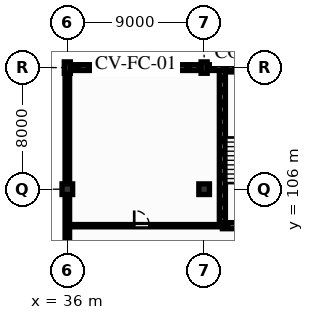
"""IFC4 building model, lengths in metres.
Left out: names, types, materials, properties, quantities, classifications, styles, units other than length and angle.
Written with IfcOpenShell. Run it as: python <this file> out.ifc"""

import sys

from ifc_helpers import new_model, si_unit, direction, frame, frame_2d, origin, origin_2d, place, context, subcontext, project, spatial, rectangle, extrude, element, fill, save


model = new_model("IFC4")
c1 = context("Model", 3, precision=1e-05, world=origin(), true_north=direction((0.0, 1.0)))
c2 = subcontext(c1, "Body", "Model", "MODEL_VIEW")
j1 = project(units=[si_unit("LENGTHUNIT", "METRE"), si_unit("PLANEANGLEUNIT", "RADIAN")], contexts=[c1])
p1 = place(None, origin())
s1 = spatial("IfcSite", under=j1, at=p1, CompositionType="ELEMENT")
p2 = place(p1, origin())
s2 = spatial("IfcBuilding", under=s1, at=p2, CompositionType="ELEMENT")
p3 = place(p2, frame((0.0, 0.0, 12.78)))
s3 = spatial("IfcBuildingStorey", under=s2, at=p3, CompositionType="ELEMENT", Elevation=12.78)
p4 = place(p3, frame((36.0, 106.0, 0.0), z_axis=(0.0, 0.0, 1.0), x_axis=(1.0, 0.0, 0.0)))
e1 = element("IfcColumn", 1, at=p4, inside=s3, PredefinedType="COLUMN", context=c2, shape_type="SweptSolid", body=[
    extrude(rectangle(XDim=0.7, YDim=0.7, at=origin_2d()), origin(), (0.0, 0.0, 1.0), 3.74),
])
p5 = place(p3, frame((36.0, 114.0, 0.0), z_axis=(0.0, 0.0, 1.0), x_axis=(0.0, 1.0, 0.0)))
e2 = element("IfcColumn", 2, at=p5, inside=s3, PredefinedType="COLUMN", context=c2, shape_type="SweptSolid", body=[
    extrude(rectangle(XDim=0.4, YDim=0.75, at=origin_2d()), origin(), (0.0, 0.0, 1.0), 3.74),
])
p6 = place(p3, frame((45.0, 106.0, 0.0), z_axis=(0.0, 0.0, 1.0), x_axis=(1.0, 0.0, 0.0)))
e3 = element("IfcColumn", 3, at=p6, inside=s3, PredefinedType="COLUMN", context=c2, shape_type="SweptSolid", body=[
    extrude(rectangle(XDim=0.7, YDim=0.7, at=origin_2d()), origin(), (0.0, 0.0, 1.0), 3.74),
])
p7 = place(p3, frame((45.0, 114.0, 0.0), z_axis=(0.0, 0.0, 1.0), x_axis=(0.0, 1.0, 0.0)))
e4 = element("IfcColumn", 4, at=p7, inside=s3, PredefinedType="COLUMN", context=c2, shape_type="SweptSolid", body=[
    extrude(rectangle(XDim=0.4, YDim=0.75, at=origin_2d()), origin(), (0.0, 0.0, 1.0), 3.74),
])
p8 = place(p3, frame((36.0, 114.0, 0.0), z_axis=(0.0, 0.0, 1.0), x_axis=(1.0, 0.0, 0.0)))
e5 = element("IfcWall", 5, at=p8, inside=s3, PredefinedType="SOLIDWALL", context=c2, shape_type="SweptSolid", body=[
    extrude(rectangle(XDim=9.0, YDim=0.38, at=frame_2d((4.5, 0.0))), origin(), (0.0, 0.0, 1.0), 3.42),
])
p9 = place(p8, frame((2.2, 0.0, 0.715)))
e6 = element("IfcOpeningElement", 6, at=p9, cuts=e5, PredefinedType="OPENING", context=c2, shape_type="SweptSolid", body=[
    extrude(rectangle(XDim=0.96, YDim=1.95, at=frame_2d((0.48, 0.975))), frame((0.0, 0.2, 0.0), z_axis=(0.0, -1.0, 0.0), x_axis=(1.0, 0.0, 0.0)), (0.0, 0.0, 1.0), 0.4),
])
p10 = place(p8, frame((5.4, 0.0, 1.015)))
e7 = element("IfcOpeningElement", 7, at=p10, cuts=e5, PredefinedType="OPENING", context=c2, shape_type="SweptSolid", body=[
    extrude(rectangle(XDim=1.1, YDim=1.65, at=frame_2d((0.55, 0.825))), frame((0.0, 0.2, 0.0), z_axis=(0.0, -1.0, 0.0), x_axis=(1.0, 0.0, 0.0)), (0.0, 0.0, 1.0), 0.4),
])
p11 = place(p3, frame((45.0, 114.0, 0.0), z_axis=(0.0, 0.0, 1.0), x_axis=(1.0, 0.0, 0.0)))
e8 = element("IfcWall", 8, at=p11, inside=s3, PredefinedType="SOLIDWALL", context=c2, shape_type="SweptSolid", body=[
    extrude(rectangle(XDim=9.0, YDim=0.38, at=frame_2d((4.5, 0.0))), origin(), (0.0, 0.0, 1.0), 3.42),
])
p12 = place(p3, frame((36.0, 82.2, 0.0), z_axis=(0.0, 0.0, 1.0), x_axis=(0.0, 1.0, 0.0)))
e9 = element("IfcWall", 9, at=p12, inside=s3, PredefinedType="SOLIDWALL", context=c2, shape_type="SweptSolid", body=[
    extrude(rectangle(XDim=31.8, YDim=0.3, at=frame_2d((15.9, 0.0))), origin(), (0.0, 0.0, 1.0), 2.705),
])
p13 = place(p12, frame((3.0, 0.0, 0.735)))
e10 = element("IfcOpeningElement", 10, at=p13, cuts=e9, PredefinedType="OPENING", context=c2, shape_type="SweptSolid", body=[
    extrude(rectangle(XDim=1.35, YDim=1.85, at=frame_2d((0.675, 0.925))), frame((0.0, 0.16, 0.0), z_axis=(0.0, -1.0, 0.0), x_axis=(1.0, 0.0, 0.0)), (0.0, 0.0, 1.0), 0.32),
])
p14 = place(p12, frame((9.5, 0.0, 0.835)))
e11 = element("IfcOpeningElement", 11, at=p14, cuts=e9, PredefinedType="OPENING", context=c2, shape_type="SweptSolid", body=[
    extrude(rectangle(XDim=1.05, YDim=1.75, at=frame_2d((0.525, 0.875))), frame((0.0, 0.16, 0.0), z_axis=(0.0, -1.0, 0.0), x_axis=(1.0, 0.0, 0.0)), (0.0, 0.0, 1.0), 0.32),
])
p15 = place(p12, frame((16.5, 0.0, 0.485)))
e12 = element("IfcOpeningElement", 12, at=p15, cuts=e9, PredefinedType="OPENING", context=c2, shape_type="SweptSolid", body=[
    extrude(rectangle(XDim=1.5, YDim=2.1, at=frame_2d((0.75, 1.05))), frame((0.0, 0.16, 0.0), z_axis=(0.0, -1.0, 0.0), x_axis=(1.0, 0.0, 0.0)), (0.0, 0.0, 1.0), 0.32),
])
p16 = place(p3, frame((46.2, 103.6, 0.0), z_axis=(0.0, 0.0, 1.0), x_axis=(1.0, 0.0, 0.0)))
e13 = element("IfcWall", 13, at=p16, inside=s3, PredefinedType="SHEAR", context=c2, shape_type="SweptSolid", body=[
    extrude(rectangle(XDim=13.2, YDim=0.4, at=frame_2d((6.6, 0.0))), origin(), (0.0, 0.0, 1.0), 3.42),
])
p17 = place(p16, frame((5.8, 0.0, 0.0)))
e14 = element("IfcOpeningElement", 14, at=p17, cuts=e13, PredefinedType="OPENING", context=c2, shape_type="SweptSolid", body=[
    extrude(rectangle(XDim=1.5, YDim=2.2, at=frame_2d((0.75, 1.1))), frame((0.0, 0.21, 0.0), z_axis=(0.0, -1.0, 0.0), x_axis=(1.0, 0.0, 0.0)), (0.0, 0.0, 1.0), 0.42),
])
p18 = place(p3, frame((46.2, 103.8, 0.0), z_axis=(0.0, 0.0, 1.0), x_axis=(0.0, 1.0, 0.0)))
e15 = element("IfcWall", 15, at=p18, inside=s3, PredefinedType="SHEAR", context=c2, shape_type="SweptSolid", body=[
    extrude(rectangle(XDim=10.01, YDim=0.4, at=frame_2d((5.005, 0.0))), origin(), (0.0, 0.0, 1.0), 3.42),
])
p19 = place(p3, frame((36.0, 103.6, 0.0), z_axis=(0.0, 0.0, 1.0), x_axis=(1.0, 0.0, 0.0)))
e16 = element("IfcWall", 16, at=p19, inside=s3, PredefinedType="PARTITIONING", context=c2, shape_type="SweptSolid", body=[
    extrude(rectangle(XDim=10.2, YDim=0.15, at=frame_2d((5.1, 0.0))), origin(), (0.0, 0.0, 1.0), 3.42),
])
p20 = place(p19, frame((4.4, 0.0, 0.0)))
e17 = element("IfcOpeningElement", 17, at=p20, cuts=e16, PredefinedType="OPENING", context=c2, shape_type="SweptSolid", body=[
    extrude(rectangle(XDim=1.0, YDim=2.15, at=frame_2d((0.5, 1.075))), frame((0.0, 0.085, 0.0), z_axis=(0.0, -1.0, 0.0), x_axis=(1.0, 0.0, 0.0)), (0.0, 0.0, 1.0), 0.17),
])
p21 = place(p9, origin())
e18 = element("IfcWindow", 18, at=p21, inside=s3, PartitioningType="SINGLE_PANEL", PredefinedType="WINDOW", context=c2, shape_type="SweptSolid", body=[
    extrude(rectangle(XDim=0.96, YDim=1.95, at=frame_2d((0.48, 0.975))), frame((0.0, 0.03, 0.0), z_axis=(0.0, -1.0, 0.0), x_axis=(1.0, 0.0, 0.0)), (0.0, 0.0, 1.0), 0.06),
])
fill(e6, e18)
p22 = place(p10, origin())
e19 = element("IfcWindow", 19, at=p22, inside=s3, PartitioningType="SINGLE_PANEL", PredefinedType="WINDOW", context=c2, shape_type="SweptSolid", body=[
    extrude(rectangle(XDim=1.1, YDim=1.65, at=frame_2d((0.55, 0.825))), frame((0.0, 0.03, 0.0), z_axis=(0.0, -1.0, 0.0), x_axis=(1.0, 0.0, 0.0)), (0.0, 0.0, 1.0), 0.06),
])
fill(e7, e19)
p23 = place(p20, origin())
e20 = element("IfcDoor", 20, at=p23, inside=s3, OperationType="SINGLE_SWING_LEFT", PredefinedType="DOOR", context=c2, shape_type="SweptSolid", body=[
    extrude(rectangle(XDim=1.0, YDim=2.15, at=frame_2d((0.5, 1.075))), frame((0.0, 0.025, 0.0), z_axis=(0.0, -1.0, 0.0), x_axis=(1.0, 0.0, 0.0)), (0.0, 0.0, 1.0), 0.05),
])
fill(e17, e20)
save(model, sys.argv[1])
